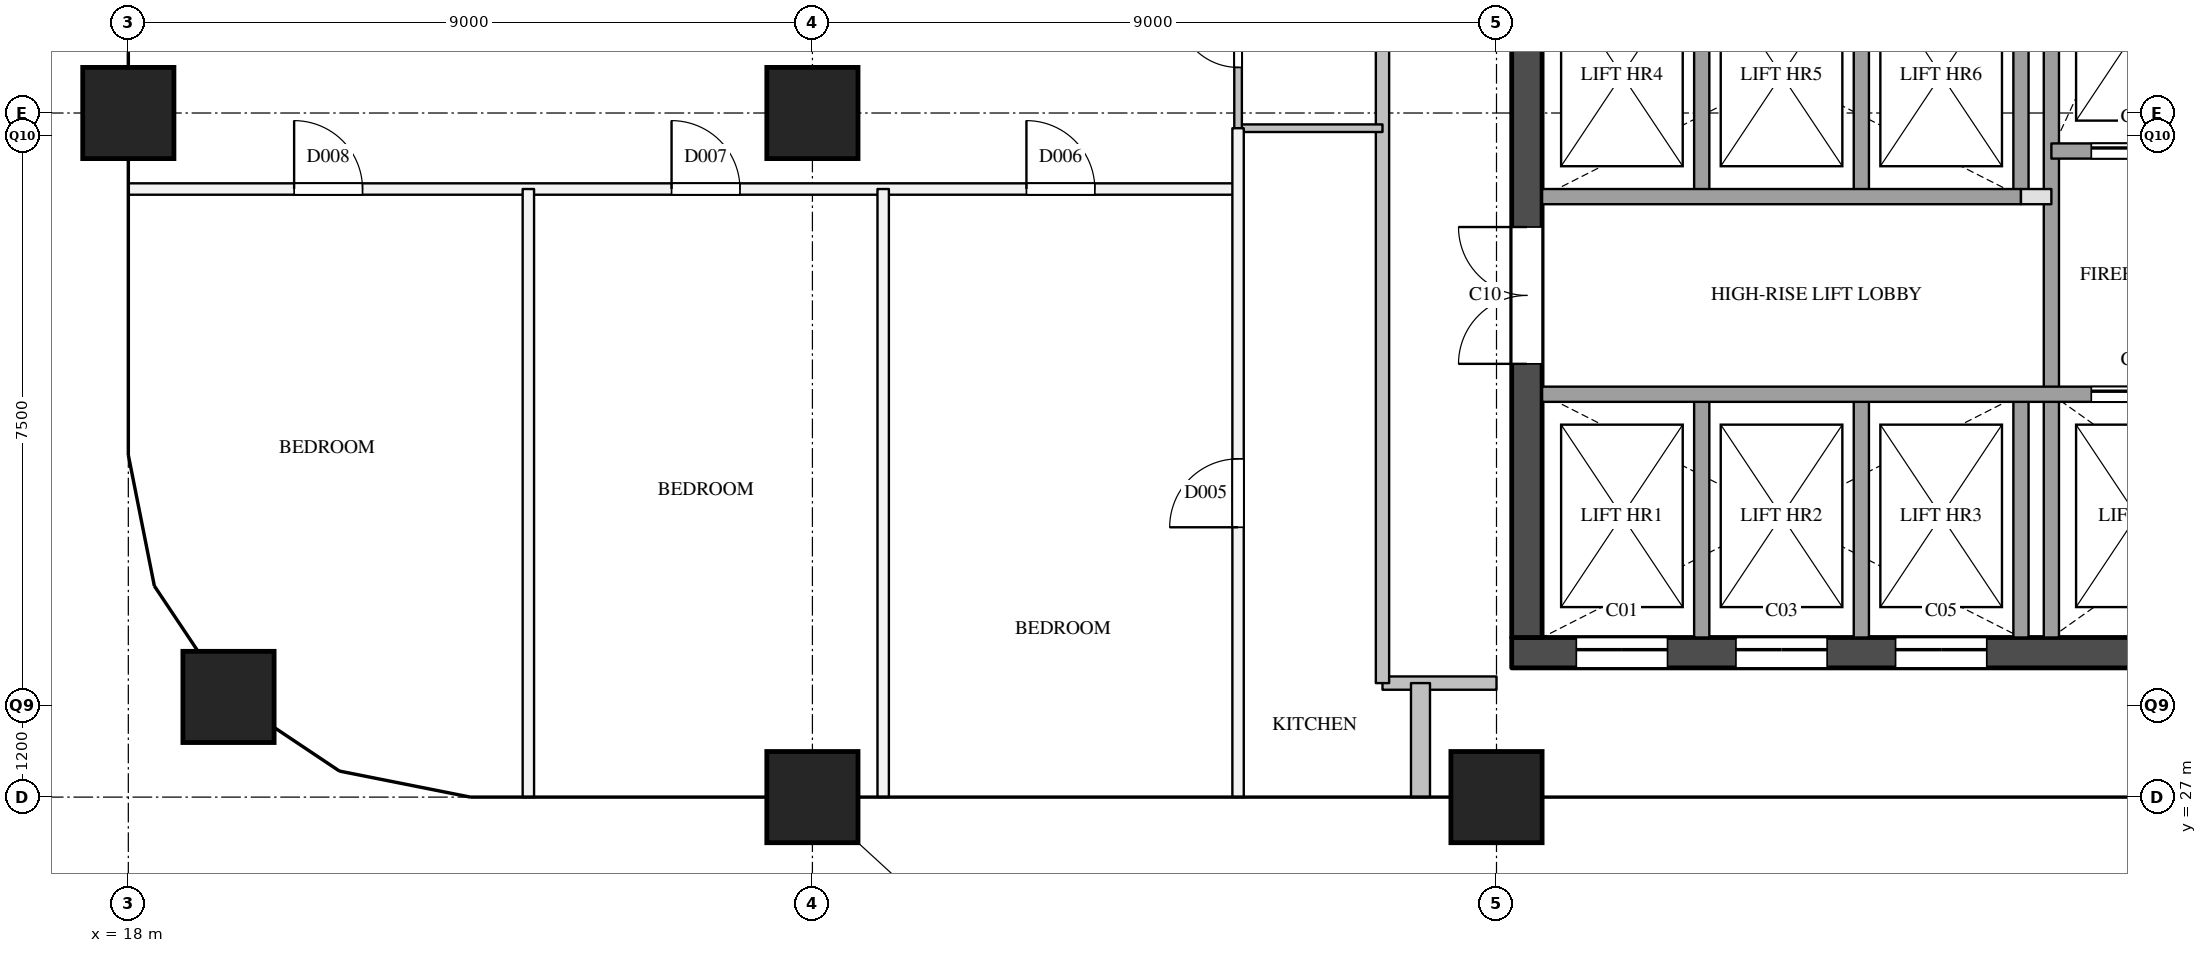
"""IFC4 building model, lengths in metres.
Left out: names, types, materials, properties, quantities, classifications, styles, units other than length and angle.
Written with IfcOpenShell. Run it as: python <this file> out.ifc"""

import sys

from ifc_helpers import new_model, si_unit, direction, frame, frame_2d, origin, origin_2d, place, context, subcontext, project, spatial, rectangle, extrude, element, fill, save


model = new_model("IFC4")
c1 = context("Model", 3, precision=1e-05, world=origin(), true_north=direction((0.0, 1.0)))
c2 = subcontext(c1, "Body", "Model", "MODEL_VIEW")
j1 = project(units=[si_unit("LENGTHUNIT", "METRE"), si_unit("PLANEANGLEUNIT", "RADIAN")], contexts=[c1])
p1 = place(None, origin())
s1 = spatial("IfcSite", under=j1, at=p1, CompositionType="ELEMENT")
p2 = place(p1, origin())
s2 = spatial("IfcBuilding", under=s1, at=p2, CompositionType="ELEMENT")
p3 = place(p2, frame((0.0, 0.0, 246.2)))
s3 = spatial("IfcBuildingStorey", under=s2, at=p3, CompositionType="ELEMENT", Elevation=246.2)
for number, where, z_axis, x_axis in (
    (1, (19.318, 28.318, 0.0), (0.0, 0.0, 1.0), (1.0, 0.0, 0.0)),
    (2, (18.0, 36.0, 0.0), (0.0, 0.0, 1.0), (1.0, 0.0, 0.0)),
    (3, (27.0, 27.0, 0.0), (0.0, 0.0, 1.0), (1.0, 0.0, 0.0)),
    (4, (27.0, 36.0, 0.0), (0.0, 0.0, 1.0), (1.0, 0.0, 0.0)),
    (5, (36.0, 27.0, 0.0), (0.0, 0.0, 1.0), (1.0, 0.0, 0.0)),
):
    element("IfcColumn", number, at=place(p3, frame(where, z_axis=z_axis, x_axis=x_axis)), inside=s3, PredefinedType="COLUMN", context=c2, shape_type="SweptSolid", body=[
        extrude(rectangle(XDim=1.2, YDim=1.2, at=origin_2d()), origin(), (0.0, 0.0, 1.0), 3.9),
    ])
p4 = place(p3, frame((36.2, 28.9, 0.0), z_axis=(0.0, 0.0, 1.0), x_axis=(1.0, 0.0, 0.0)))
e6 = element("IfcWall", 6, at=p4, inside=s3, PredefinedType="SHEAR", context=c2, shape_type="SweptSolid", body=[
    extrude(rectangle(XDim=12.0, YDim=0.4, at=frame_2d((6.0, 0.0))), origin(), (0.0, 0.0, 1.0), 3.6),
])
p5 = place(p4, frame((0.85, 0.0, 0.0)))
e7 = element("IfcOpeningElement", 7, at=p5, cuts=e6, PredefinedType="OPENING", context=c2, shape_type="SweptSolid", body=[
    extrude(rectangle(XDim=1.2, YDim=2.1, at=frame_2d((0.6, 1.05))), frame((0.0, 0.21, 0.0), z_axis=(0.0, -1.0, 0.0), x_axis=(1.0, 0.0, 0.0)), (0.0, 0.0, 1.0), 0.42),
])
p6 = place(p4, frame((2.95, 0.0, 0.0)))
e8 = element("IfcOpeningElement", 8, at=p6, cuts=e6, PredefinedType="OPENING", context=c2, shape_type="SweptSolid", body=[
    extrude(rectangle(XDim=1.2, YDim=2.1, at=frame_2d((0.6, 1.05))), frame((0.0, 0.21, 0.0), z_axis=(0.0, -1.0, 0.0), x_axis=(1.0, 0.0, 0.0)), (0.0, 0.0, 1.0), 0.42),
])
p7 = place(p4, frame((5.05, 0.0, 0.0)))
e9 = element("IfcOpeningElement", 9, at=p7, cuts=e6, PredefinedType="OPENING", context=c2, shape_type="SweptSolid", body=[
    extrude(rectangle(XDim=1.2, YDim=2.1, at=frame_2d((0.6, 1.05))), frame((0.0, 0.21, 0.0), z_axis=(0.0, -1.0, 0.0), x_axis=(1.0, 0.0, 0.0)), (0.0, 0.0, 1.0), 0.42),
])
p8 = place(p3, frame((36.4, 29.1, 0.0), z_axis=(0.0, 0.0, 1.0), x_axis=(0.0, 1.0, 0.0)))
e10 = element("IfcWall", 10, at=p8, inside=s3, PredefinedType="SHEAR", context=c2, shape_type="SweptSolid", body=[
    extrude(rectangle(XDim=20.3, YDim=0.4, at=frame_2d((10.15, 0.0))), origin(), (0.0, 0.0, 1.0), 3.6),
])
p9 = place(p8, frame((3.6, 0.0, 0.0)))
e11 = element("IfcOpeningElement", 11, at=p9, cuts=e10, PredefinedType="OPENING", context=c2, shape_type="SweptSolid", body=[
    extrude(rectangle(XDim=1.8, YDim=2.1, at=frame_2d((0.9, 1.05))), frame((0.0, 0.21, 0.0), z_axis=(0.0, -1.0, 0.0), x_axis=(1.0, 0.0, 0.0)), (0.0, 0.0, 1.0), 0.42),
])
p10 = place(p8, frame((16.4, 0.0, 0.0)))
e12 = element("IfcOpeningElement", 12, at=p10, cuts=e10, PredefinedType="OPENING", context=c2, shape_type="SweptSolid", body=[
    extrude(rectangle(XDim=1.0, YDim=2.1, at=frame_2d((0.5, 1.05))), frame((0.0, 0.21, 0.0), z_axis=(0.0, -1.0, 0.0), x_axis=(1.0, 0.0, 0.0)), (0.0, 0.0, 1.0), 0.42),
])
p11 = place(p3, frame((38.7, 29.1, 0.0), z_axis=(0.0, 0.0, 1.0), x_axis=(0.0, 1.0, 0.0)))
e13 = element("IfcWall", 13, at=p11, inside=s3, PredefinedType="SOLIDWALL", context=c2, shape_type="SweptSolid", body=[
    extrude(rectangle(XDim=3.2, YDim=0.2, at=frame_2d((1.6, 0.0))), origin(), (0.0, 0.0, 1.0), 3.6),
])
p12 = place(p3, frame((38.7, 34.9, 0.0), z_axis=(0.0, 0.0, 1.0), x_axis=(0.0, 1.0, 0.0)))
e14 = element("IfcWall", 14, at=p12, inside=s3, PredefinedType="SOLIDWALL", context=c2, shape_type="SweptSolid", body=[
    extrude(rectangle(XDim=3.2, YDim=0.2, at=frame_2d((1.6, 0.0))), origin(), (0.0, 0.0, 1.0), 3.6),
])
p13 = place(p3, frame((40.8, 29.1, 0.0), z_axis=(0.0, 0.0, 1.0), x_axis=(0.0, 1.0, 0.0)))
e15 = element("IfcWall", 15, at=p13, inside=s3, PredefinedType="SOLIDWALL", context=c2, shape_type="SweptSolid", body=[
    extrude(rectangle(XDim=3.2, YDim=0.2, at=frame_2d((1.6, 0.0))), origin(), (0.0, 0.0, 1.0), 3.6),
])
p14 = place(p3, frame((40.8, 34.9, 0.0), z_axis=(0.0, 0.0, 1.0), x_axis=(0.0, 1.0, 0.0)))
e16 = element("IfcWall", 16, at=p14, inside=s3, PredefinedType="SOLIDWALL", context=c2, shape_type="SweptSolid", body=[
    extrude(rectangle(XDim=3.2, YDim=0.2, at=frame_2d((1.6, 0.0))), origin(), (0.0, 0.0, 1.0), 3.6),
])
p15 = place(p3, frame((42.9, 29.1, 0.0), z_axis=(0.0, 0.0, 1.0), x_axis=(0.0, 1.0, 0.0)))
e17 = element("IfcWall", 17, at=p15, inside=s3, PredefinedType="SOLIDWALL", context=c2, shape_type="SweptSolid", body=[
    extrude(rectangle(XDim=3.2, YDim=0.2, at=frame_2d((1.6, 0.0))), origin(), (0.0, 0.0, 1.0), 3.6),
])
p16 = place(p3, frame((42.9, 34.9, 0.0), z_axis=(0.0, 0.0, 1.0), x_axis=(0.0, 1.0, 0.0)))
e18 = element("IfcWall", 18, at=p16, inside=s3, PredefinedType="SOLIDWALL", context=c2, shape_type="SweptSolid", body=[
    extrude(rectangle(XDim=3.2, YDim=0.2, at=frame_2d((1.6, 0.0))), origin(), (0.0, 0.0, 1.0), 3.6),
])
p17 = place(p3, frame((43.3, 29.1, 0.0), z_axis=(0.0, 0.0, 1.0), x_axis=(0.0, 1.0, 0.0)))
e19 = element("IfcWall", 19, at=p17, inside=s3, PredefinedType="SOLIDWALL", context=c2, shape_type="SweptSolid", body=[
    extrude(rectangle(XDim=9.9, YDim=0.2, at=frame_2d((4.95, 0.0))), origin(), (0.0, 0.0, 1.0), 3.6),
])
p18 = place(p3, frame((36.6, 32.3, 0.0), z_axis=(0.0, 0.0, 1.0), x_axis=(1.0, 0.0, 0.0)))
e20 = element("IfcWall", 20, at=p18, inside=s3, PredefinedType="SOLIDWALL", context=c2, shape_type="SweptSolid", body=[
    extrude(rectangle(XDim=11.2, YDim=0.2, at=frame_2d((5.6, 0.0))), origin(), (0.0, 0.0, 1.0), 3.6),
])
p19 = place(p18, frame((7.225, 0.0, 0.0)))
e21 = element("IfcOpeningElement", 21, at=p19, cuts=e20, PredefinedType="OPENING", context=c2, shape_type="SweptSolid", body=[
    extrude(rectangle(XDim=1.2, YDim=2.1, at=frame_2d((0.6, 1.05))), frame((0.0, 0.11, 0.0), z_axis=(0.0, -1.0, 0.0), x_axis=(1.0, 0.0, 0.0)), (0.0, 0.0, 1.0), 0.22),
])
p20 = place(p18, frame((9.475, 0.0, 0.0)))
e22 = element("IfcOpeningElement", 22, at=p20, cuts=e20, PredefinedType="OPENING", context=c2, shape_type="SweptSolid", body=[
    extrude(rectangle(XDim=1.2, YDim=2.1, at=frame_2d((0.6, 1.05))), frame((0.0, 0.11, 0.0), z_axis=(0.0, -1.0, 0.0), x_axis=(1.0, 0.0, 0.0)), (0.0, 0.0, 1.0), 0.22),
])
p21 = place(p3, frame((42.9, 34.9, 0.0), z_axis=(0.0, 0.0, 1.0), x_axis=(1.0, 0.0, 0.0)))
e23 = element("IfcWall", 23, at=p21, inside=s3, PredefinedType="PARTITIONING", context=c2, shape_type="SweptSolid", body=[
    extrude(rectangle(XDim=0.4, YDim=0.2, at=frame_2d((0.2, 0.0))), origin(), (0.0, 0.0, 1.0), 3.6),
])
p22 = place(p3, frame((36.6, 34.9, 0.0), z_axis=(0.0, 0.0, 1.0), x_axis=(1.0, 0.0, 0.0)))
e24 = element("IfcWall", 24, at=p22, inside=s3, PredefinedType="SOLIDWALL", context=c2, shape_type="SweptSolid", body=[
    extrude(rectangle(XDim=6.3, YDim=0.2, at=frame_2d((3.15, 0.0))), origin(), (0.0, 0.0, 1.0), 3.6),
])
p23 = place(p3, frame((43.3, 35.5, 0.0), z_axis=(0.0, 0.0, 1.0), x_axis=(1.0, 0.0, 0.0)))
e25 = element("IfcWall", 25, at=p23, inside=s3, PredefinedType="SOLIDWALL", context=c2, shape_type="SweptSolid", body=[
    extrude(rectangle(XDim=4.5, YDim=0.2, at=frame_2d((2.25, 0.0))), origin(), (0.0, 0.0, 1.0), 3.6),
])
p24 = place(p23, frame((0.525, 0.0, 0.0)))
e26 = element("IfcOpeningElement", 26, at=p24, cuts=e25, PredefinedType="OPENING", context=c2, shape_type="SweptSolid", body=[
    extrude(rectangle(XDim=1.2, YDim=2.1, at=frame_2d((0.6, 1.05))), frame((0.0, 0.11, 0.0), z_axis=(0.0, -1.0, 0.0), x_axis=(1.0, 0.0, 0.0)), (0.0, 0.0, 1.0), 0.22),
])
p25 = place(p23, frame((3.025, 0.0, 0.0)))
e27 = element("IfcOpeningElement", 27, at=p25, cuts=e25, PredefinedType="OPENING", context=c2, shape_type="SweptSolid", body=[
    extrude(rectangle(XDim=0.7, YDim=2.1, at=frame_2d((0.35, 1.05))), frame((0.0, 0.11, 0.0), z_axis=(0.0, -1.0, 0.0), x_axis=(1.0, 0.0, 0.0)), (0.0, 0.0, 1.0), 0.22),
])
p26 = place(p3, frame((34.5, 28.5, 0.0), z_axis=(0.0, 0.0, 1.0), x_axis=(1.0, 0.0, 0.0)))
e28 = element("IfcWall", 28, at=p26, inside=s3, PredefinedType="PARTITIONING", context=c2, shape_type="SweptSolid", body=[
    extrude(rectangle(XDim=1.5, YDim=0.175, at=frame_2d((0.75, 0.0))), origin(), (0.0, 0.0, 1.0), 3.6),
])
p27 = place(p3, frame((34.5, 28.5, 0.0), z_axis=(0.0, 0.0, 1.0), x_axis=(0.0, 1.0, 0.0)))
e29 = element("IfcWall", 29, at=p27, inside=s3, PredefinedType="PARTITIONING", context=c2, shape_type="SweptSolid", body=[
    extrude(rectangle(XDim=15.7, YDim=0.175, at=frame_2d((7.85, 0.0))), origin(), (0.0, 0.0, 1.0), 3.6),
])
p28 = place(p27, frame((10.1, 0.0, 0.0)))
e30 = element("IfcOpeningElement", 30, at=p28, cuts=e29, PredefinedType="OPENING", context=c2, shape_type="SweptSolid", body=[
    extrude(rectangle(XDim=1.0, YDim=2.1, at=frame_2d((0.5, 1.05))), frame((0.0, 0.097, 0.0), z_axis=(0.0, -1.0, 0.0), x_axis=(1.0, 0.0, 0.0)), (0.0, 0.0, 1.0), 0.195),
])
p29 = place(p27, frame((11.9, 0.0, 0.0)))
e31 = element("IfcOpeningElement", 31, at=p29, cuts=e29, PredefinedType="OPENING", context=c2, shape_type="SweptSolid", body=[
    extrude(rectangle(XDim=1.0, YDim=2.1, at=frame_2d((0.5, 1.05))), frame((0.0, 0.097, 0.0), z_axis=(0.0, -1.0, 0.0), x_axis=(1.0, 0.0, 0.0)), (0.0, 0.0, 1.0), 0.195),
])
p30 = place(p3, frame((18.0, 35.0, 0.0), z_axis=(0.0, 0.0, 1.0), x_axis=(1.0, 0.0, 0.0)))
e32 = element("IfcWall", 32, at=p30, inside=s3, PredefinedType="PARTITIONING", context=c2, shape_type="SweptSolid", body=[
    extrude(rectangle(XDim=14.6, YDim=0.15, at=frame_2d((7.3, 0.0))), origin(), (0.0, 0.0, 1.0), 2.6),
])
p31 = place(p30, frame((11.816, 0.0, 0.0)))
e33 = element("IfcOpeningElement", 33, at=p31, cuts=e32, PredefinedType="OPENING", context=c2, shape_type="SweptSolid", body=[
    extrude(rectangle(XDim=0.9, YDim=2.1, at=frame_2d((0.45, 1.05))), frame((0.0, 0.085, 0.0), z_axis=(0.0, -1.0, 0.0), x_axis=(1.0, 0.0, 0.0)), (0.0, 0.0, 1.0), 0.17),
])
p32 = place(p30, frame((7.147, 0.0, 0.0)))
e34 = element("IfcOpeningElement", 34, at=p32, cuts=e32, PredefinedType="OPENING", context=c2, shape_type="SweptSolid", body=[
    extrude(rectangle(XDim=0.9, YDim=2.1, at=frame_2d((0.45, 1.05))), frame((0.0, 0.085, 0.0), z_axis=(0.0, -1.0, 0.0), x_axis=(1.0, 0.0, 0.0)), (0.0, 0.0, 1.0), 0.17),
])
p33 = place(p30, frame((2.181, 0.0, 0.0)))
e35 = element("IfcOpeningElement", 35, at=p33, cuts=e32, PredefinedType="OPENING", context=c2, shape_type="SweptSolid", body=[
    extrude(rectangle(XDim=0.9, YDim=2.1, at=frame_2d((0.45, 1.05))), frame((0.0, 0.085, 0.0), z_axis=(0.0, -1.0, 0.0), x_axis=(1.0, 0.0, 0.0)), (0.0, 0.0, 1.0), 0.17),
])
for number, where, z_axis, x_axis in (
    (36, (23.263, 27.0, 0.0), (0.0, 0.0, 1.0), (0.0, 1.0, 0.0)),
    (37, (27.931, 27.0, 0.0), (0.0, 0.0, 1.0), (0.0, 1.0, 0.0)),
):
    element("IfcWall", number, at=place(p3, frame(where, z_axis=z_axis, x_axis=x_axis)), inside=s3, PredefinedType="PARTITIONING", context=c2, shape_type="SweptSolid", body=[
        extrude(rectangle(XDim=8.0, YDim=0.15, at=frame_2d((4.0, 0.0))), origin(), (0.0, 0.0, 1.0), 2.6),
    ])
p34 = place(p3, frame((32.6, 27.0, 0.0), z_axis=(0.0, 0.0, 1.0), x_axis=(0.0, 1.0, 0.0)))
e38 = element("IfcWall", 38, at=p34, inside=s3, PredefinedType="PARTITIONING", context=c2, shape_type="SweptSolid", body=[
    extrude(rectangle(XDim=8.8, YDim=0.15, at=frame_2d((4.4, 0.0))), origin(), (0.0, 0.0, 1.0), 2.6),
])
p35 = place(p34, frame((3.55, 0.0, 0.0)))
e39 = element("IfcOpeningElement", 39, at=p35, cuts=e38, PredefinedType="OPENING", context=c2, shape_type="SweptSolid", body=[
    extrude(rectangle(XDim=0.9, YDim=2.1, at=frame_2d((0.45, 1.05))), frame((0.0, 0.085, 0.0), z_axis=(0.0, -1.0, 0.0), x_axis=(1.0, 0.0, 0.0)), (0.0, 0.0, 1.0), 0.17),
])
p36 = place(p3, frame((35.0, 27.0, 0.0), z_axis=(0.0, 0.0, 1.0), x_axis=(0.0, 1.0, 0.0)))
e40 = element("IfcWall", 40, at=p36, inside=s3, PredefinedType="PARTITIONING", context=c2, shape_type="SweptSolid", body=[
    extrude(rectangle(XDim=1.5, YDim=0.25, at=frame_2d((0.75, 0.0))), origin(), (0.0, 0.0, 1.0), 2.6),
])
p37 = place(p3, frame((32.6, 35.8, 0.0), z_axis=(0.0, 0.0, 1.0), x_axis=(1.0, 0.0, 0.0)))
e41 = element("IfcWall", 41, at=p37, inside=s3, PredefinedType="PARTITIONING", context=c2, shape_type="SweptSolid", body=[
    extrude(rectangle(XDim=1.9, YDim=0.1, at=frame_2d((0.95, 0.0))), origin(), (0.0, 0.0, 1.0), 3.6),
])
p38 = place(p3, frame((32.6, 35.8, 0.0), z_axis=(0.0, 0.0, 1.0), x_axis=(0.0, 1.0, 0.0)))
e42 = element("IfcWall", 42, at=p38, inside=s3, PredefinedType="PARTITIONING", context=c2, shape_type="SweptSolid", body=[
    extrude(rectangle(XDim=2.4, YDim=0.1, at=frame_2d((1.2, 0.0))), origin(), (0.0, 0.0, 1.0), 3.6),
])
p39 = place(p38, frame((0.8, 0.0, 0.0)))
e43 = element("IfcOpeningElement", 43, at=p39, cuts=e42, PredefinedType="OPENING", context=c2, shape_type="SweptSolid", body=[
    extrude(rectangle(XDim=0.8, YDim=2.1, at=frame_2d((0.4, 1.05))), frame((0.0, 0.06, 0.0), z_axis=(0.0, -1.0, 0.0), x_axis=(1.0, 0.0, 0.0)), (0.0, 0.0, 1.0), 0.12),
])
p40 = place(p5, origin())
e44 = element("IfcDoor", 44, at=p40, inside=s3, OperationType="SLIDING_TO_LEFT", PredefinedType="DOOR", context=c2, shape_type="SweptSolid", body=[
    extrude(rectangle(XDim=1.2, YDim=2.1, at=frame_2d((0.6, 1.05))), frame((0.0, 0.025, 0.0), z_axis=(0.0, -1.0, 0.0), x_axis=(1.0, 0.0, 0.0)), (0.0, 0.0, 1.0), 0.05),
])
fill(e7, e44)
p41 = place(p6, origin())
e45 = element("IfcDoor", 45, at=p41, inside=s3, OperationType="SLIDING_TO_LEFT", PredefinedType="DOOR", context=c2, shape_type="SweptSolid", body=[
    extrude(rectangle(XDim=1.2, YDim=2.1, at=frame_2d((0.6, 1.05))), frame((0.0, 0.025, 0.0), z_axis=(0.0, -1.0, 0.0), x_axis=(1.0, 0.0, 0.0)), (0.0, 0.0, 1.0), 0.05),
])
fill(e8, e45)
p42 = place(p7, origin())
e46 = element("IfcDoor", 46, at=p42, inside=s3, OperationType="SLIDING_TO_LEFT", PredefinedType="DOOR", context=c2, shape_type="SweptSolid", body=[
    extrude(rectangle(XDim=1.2, YDim=2.1, at=frame_2d((0.6, 1.05))), frame((0.0, 0.025, 0.0), z_axis=(0.0, -1.0, 0.0), x_axis=(1.0, 0.0, 0.0)), (0.0, 0.0, 1.0), 0.05),
])
fill(e9, e46)
p43 = place(p19, origin())
e47 = element("IfcDoor", 47, at=p43, inside=s3, OperationType="SLIDING_TO_LEFT", PredefinedType="DOOR", context=c2, shape_type="SweptSolid", body=[
    extrude(rectangle(XDim=1.2, YDim=2.1, at=frame_2d((0.6, 1.05))), frame((0.0, 0.025, 0.0), z_axis=(0.0, -1.0, 0.0), x_axis=(1.0, 0.0, 0.0)), (0.0, 0.0, 1.0), 0.05),
])
fill(e21, e47)
p44 = place(p24, origin())
e48 = element("IfcDoor", 48, at=p44, inside=s3, OperationType="SLIDING_TO_LEFT", PredefinedType="DOOR", context=c2, shape_type="SweptSolid", body=[
    extrude(rectangle(XDim=1.2, YDim=2.1, at=frame_2d((0.6, 1.05))), frame((0.0, 0.025, 0.0), z_axis=(0.0, -1.0, 0.0), x_axis=(1.0, 0.0, 0.0)), (0.0, 0.0, 1.0), 0.05),
])
fill(e26, e48)
p45 = place(p9, origin())
e49 = element("IfcDoor", 49, at=p45, inside=s3, OperationType="DOUBLE_DOOR_SINGLE_SWING", PredefinedType="DOOR", context=c2, shape_type="SweptSolid", body=[
    extrude(rectangle(XDim=1.8, YDim=2.1, at=frame_2d((0.9, 1.05))), frame((0.0, 0.025, 0.0), z_axis=(0.0, -1.0, 0.0), x_axis=(1.0, 0.0, 0.0)), (0.0, 0.0, 1.0), 0.05),
])
fill(e11, e49)
p46 = place(p39, origin())
e50 = element("IfcDoor", 50, at=p46, inside=s3, OperationType="SINGLE_SWING_RIGHT", PredefinedType="DOOR", context=c2, shape_type="SweptSolid", body=[
    extrude(rectangle(XDim=0.8, YDim=2.1, at=frame_2d((0.4, 1.05))), frame((0.0, 0.025, 0.0), z_axis=(0.0, -1.0, 0.0), x_axis=(1.0, 0.0, 0.0)), (0.0, 0.0, 1.0), 0.05),
])
fill(e43, e50)
p47 = place(p35, origin())
e51 = element("IfcDoor", 51, at=p47, inside=s3, OperationType="SINGLE_SWING_LEFT", PredefinedType="DOOR", context=c2, shape_type="SweptSolid", body=[
    extrude(rectangle(XDim=0.9, YDim=2.1, at=frame_2d((0.45, 1.05))), frame((0.0, 0.025, 0.0), z_axis=(0.0, -1.0, 0.0), x_axis=(1.0, 0.0, 0.0)), (0.0, 0.0, 1.0), 0.05),
])
fill(e39, e51)
p48 = place(p31, origin())
e52 = element("IfcDoor", 52, at=p48, inside=s3, OperationType="SINGLE_SWING_LEFT", PredefinedType="DOOR", context=c2, shape_type="SweptSolid", body=[
    extrude(rectangle(XDim=0.9, YDim=2.1, at=frame_2d((0.45, 1.05))), frame((0.0, 0.025, 0.0), z_axis=(0.0, -1.0, 0.0), x_axis=(1.0, 0.0, 0.0)), (0.0, 0.0, 1.0), 0.05),
])
fill(e33, e52)
p49 = place(p32, origin())
e53 = element("IfcDoor", 53, at=p49, inside=s3, OperationType="SINGLE_SWING_LEFT", PredefinedType="DOOR", context=c2, shape_type="SweptSolid", body=[
    extrude(rectangle(XDim=0.9, YDim=2.1, at=frame_2d((0.45, 1.05))), frame((0.0, 0.025, 0.0), z_axis=(0.0, -1.0, 0.0), x_axis=(1.0, 0.0, 0.0)), (0.0, 0.0, 1.0), 0.05),
])
fill(e34, e53)
p50 = place(p33, origin())
e54 = element("IfcDoor", 54, at=p50, inside=s3, OperationType="SINGLE_SWING_LEFT", PredefinedType="DOOR", context=c2, shape_type="SweptSolid", body=[
    extrude(rectangle(XDim=0.9, YDim=2.1, at=frame_2d((0.45, 1.05))), frame((0.0, 0.025, 0.0), z_axis=(0.0, -1.0, 0.0), x_axis=(1.0, 0.0, 0.0)), (0.0, 0.0, 1.0), 0.05),
])
fill(e35, e54)
save(model, sys.argv[1])
